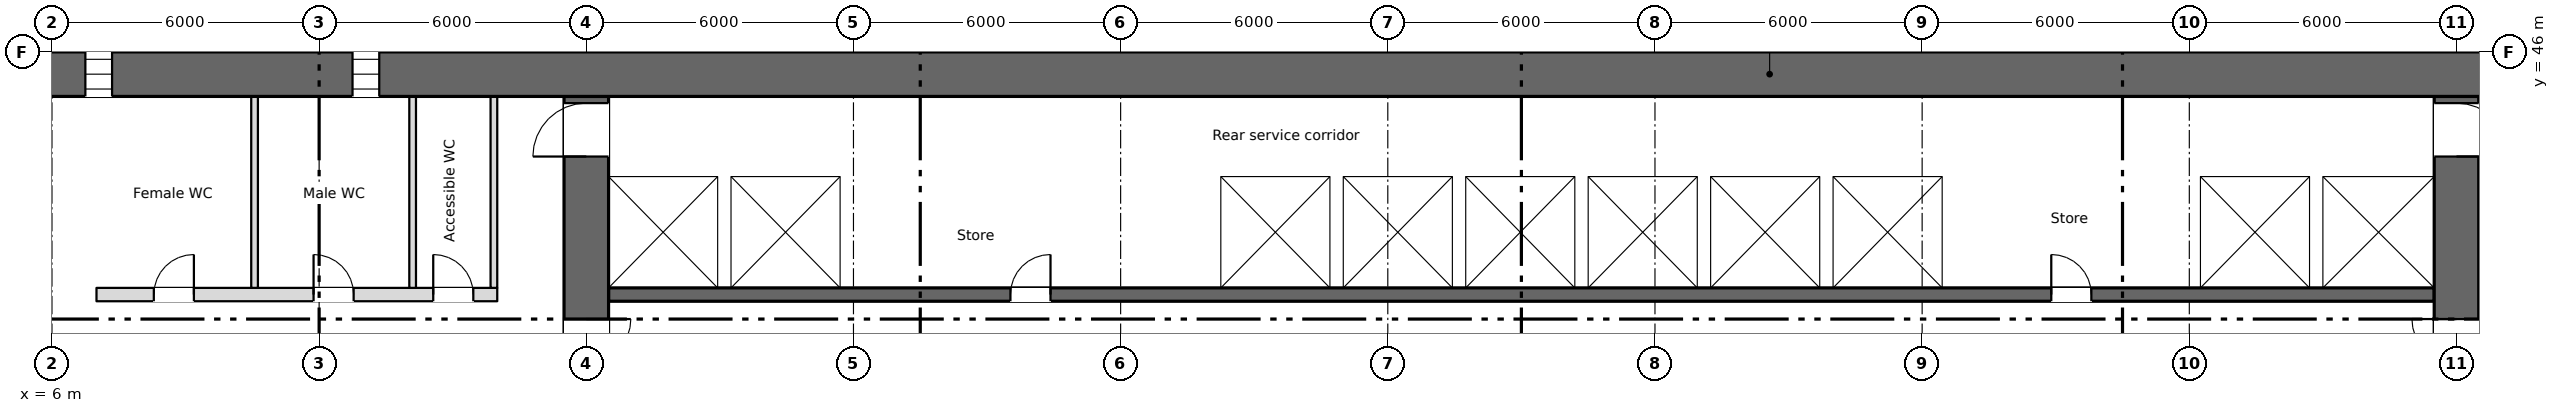
"""IFC4 building model, lengths in metres.
Left out: names, types, materials, properties, quantities, classifications, styles, units other than length and angle.
Written with IfcOpenShell. Run it as: python <this file> out.ifc"""

import sys

from ifc_helpers import new_model, si_unit, direction, frame, frame_2d, origin, place, context, subcontext, project, spatial, rectangle, extrude, element, fill, save


model = new_model("IFC4")
c1 = context("Model", 3, precision=1e-05, world=origin(), true_north=direction((0.0, 1.0)))
c2 = subcontext(c1, "Body", "Model", "MODEL_VIEW")
j1 = project(units=[si_unit("LENGTHUNIT", "METRE"), si_unit("PLANEANGLEUNIT", "RADIAN")], contexts=[c1])
p1 = place(None, origin())
s1 = spatial("IfcSite", under=j1, at=p1, CompositionType="ELEMENT")
p2 = place(p1, origin())
s2 = spatial("IfcBuilding", under=s1, at=p2, CompositionType="ELEMENT")
p3 = place(p2, frame((0.0, 0.0, 52.5)))
s3 = spatial("IfcBuildingStorey", under=s2, at=p3, CompositionType="ELEMENT", Elevation=52.5)
p4 = place(p3, frame((5.55, 45.5, 0.0), z_axis=(0.0, 0.0, 1.0), x_axis=(1.0, 0.0, 0.0)))
e1 = element("IfcWall", 1, at=p4, inside=s3, PredefinedType="SHEAR", context=c2, shape_type="SweptSolid", body=[
    extrude(rectangle(XDim=66.9, YDim=1.0, at=frame_2d((33.45, 0.0))), origin(), (0.0, 0.0, 1.0), 3.35),
])
p5 = place(p4, frame((1.2, 0.0, 0.6)))
e2 = element("IfcOpeningElement", 2, at=p5, cuts=e1, PredefinedType="OPENING", context=c2, shape_type="SweptSolid", body=[
    extrude(rectangle(XDim=0.6, YDim=2.4, at=frame_2d((0.3, 1.2))), frame((0.0, 0.51, 0.0), z_axis=(0.0, -1.0, 0.0), x_axis=(1.0, 0.0, 0.0)), (0.0, 0.0, 1.0), 1.02),
])
p6 = place(p4, frame((7.2, 0.0, 0.6)))
e3 = element("IfcOpeningElement", 3, at=p6, cuts=e1, PredefinedType="OPENING", context=c2, shape_type="SweptSolid", body=[
    extrude(rectangle(XDim=0.6, YDim=2.4, at=frame_2d((0.3, 1.2))), frame((0.0, 0.51, 0.0), z_axis=(0.0, -1.0, 0.0), x_axis=(1.0, 0.0, 0.0)), (0.0, 0.0, 1.0), 1.02),
])
p7 = place(p4, frame((61.2, 0.0, 0.6)))
e4 = element("IfcOpeningElement", 4, at=p7, cuts=e1, PredefinedType="OPENING", context=c2, shape_type="SweptSolid", body=[
    extrude(rectangle(XDim=0.6, YDim=2.4, at=frame_2d((0.3, 1.2))), frame((0.0, 0.51, 0.0), z_axis=(0.0, -1.0, 0.0), x_axis=(1.0, 0.0, 0.0)), (0.0, 0.0, 1.0), 1.02),
])
p8 = place(p3, frame((6.85, 28.4, 0.0), z_axis=(0.0, 0.0, 1.0), x_axis=(0.0, 1.0, 0.0)))
e5 = element("IfcWall", 5, at=p8, inside=s3, PredefinedType="SHEAR", context=c2, shape_type="SweptSolid", body=[
    extrude(rectangle(XDim=16.6, YDim=0.3, at=frame_2d((8.3, 0.0))), origin(), (0.0, 0.0, 1.0), 3.35),
])
p9 = place(p3, frame((18.0, 28.4, 0.0), z_axis=(0.0, 0.0, 1.0), x_axis=(0.0, 1.0, 0.0)))
e6 = element("IfcWall", 6, at=p9, inside=s3, PredefinedType="SHEAR", context=c2, shape_type="SweptSolid", body=[
    extrude(rectangle(XDim=16.6, YDim=1.0, at=frame_2d((8.3, 0.0))), origin(), (0.0, 0.0, 1.0), 3.35),
])
p10 = place(p9, frame((9.6, 0.0, 0.0)))
e7 = element("IfcOpeningElement", 7, at=p10, cuts=e6, PredefinedType="OPENING", context=c2, shape_type="SweptSolid", body=[
    extrude(rectangle(XDim=2.0, YDim=2.1, at=frame_2d((1.0, 1.05))), frame((0.0, 0.51, 0.0), z_axis=(0.0, -1.0, 0.0), x_axis=(1.0, 0.0, 0.0)), (0.0, 0.0, 1.0), 1.02),
])
p11 = place(p9, frame((15.25, 0.0, 0.0)))
e8 = element("IfcOpeningElement", 8, at=p11, cuts=e6, PredefinedType="OPENING", context=c2, shape_type="SweptSolid", body=[
    extrude(rectangle(XDim=1.2, YDim=2.1, at=frame_2d((0.6, 1.05))), frame((0.0, 0.51, 0.0), z_axis=(0.0, -1.0, 0.0), x_axis=(1.0, 0.0, 0.0)), (0.0, 0.0, 1.0), 1.02),
])
p12 = place(p3, frame((60.0, 28.4, 0.0), z_axis=(0.0, 0.0, 1.0), x_axis=(0.0, 1.0, 0.0)))
e9 = element("IfcWall", 9, at=p12, inside=s3, PredefinedType="SHEAR", context=c2, shape_type="SweptSolid", body=[
    extrude(rectangle(XDim=16.6, YDim=1.0, at=frame_2d((8.3, 0.0))), origin(), (0.0, 0.0, 1.0), 3.35),
])
p13 = place(p12, frame((9.6, 0.0, 0.0)))
e10 = element("IfcOpeningElement", 10, at=p13, cuts=e9, PredefinedType="OPENING", context=c2, shape_type="SweptSolid", body=[
    extrude(rectangle(XDim=2.0, YDim=2.1, at=frame_2d((1.0, 1.05))), frame((0.0, 0.51, 0.0), z_axis=(0.0, -1.0, 0.0), x_axis=(1.0, 0.0, 0.0)), (0.0, 0.0, 1.0), 1.02),
])
p14 = place(p12, frame((15.25, 0.0, 0.0)))
e11 = element("IfcOpeningElement", 11, at=p14, cuts=e9, PredefinedType="OPENING", context=c2, shape_type="SweptSolid", body=[
    extrude(rectangle(XDim=1.2, YDim=2.1, at=frame_2d((0.6, 1.05))), frame((0.0, 0.51, 0.0), z_axis=(0.0, -1.0, 0.0), x_axis=(1.0, 0.0, 0.0)), (0.0, 0.0, 1.0), 1.02),
])
p15 = place(p3, frame((18.5, 40.55, 0.0), z_axis=(0.0, 0.0, 1.0), x_axis=(1.0, 0.0, 0.0)))
e12 = element("IfcWall", 12, at=p15, inside=s3, PredefinedType="SHEAR", context=c2, shape_type="SweptSolid", body=[
    extrude(rectangle(XDim=41.0, YDim=0.3, at=frame_2d((20.5, 0.0))), origin(), (0.0, 0.0, 1.0), 3.35),
])
p16 = place(p15, frame((9.025, 0.0, 0.0)))
e13 = element("IfcOpeningElement", 13, at=p16, cuts=e12, PredefinedType="OPENING", context=c2, shape_type="SweptSolid", body=[
    extrude(rectangle(XDim=0.9, YDim=2.1, at=frame_2d((0.45, 1.05))), frame((0.0, 0.16, 0.0), z_axis=(0.0, -1.0, 0.0), x_axis=(1.0, 0.0, 0.0)), (0.0, 0.0, 1.0), 0.32),
])
p17 = place(p15, frame((32.4, 0.0, 0.0)))
e14 = element("IfcOpeningElement", 14, at=p17, cuts=e12, PredefinedType="OPENING", context=c2, shape_type="SweptSolid", body=[
    extrude(rectangle(XDim=0.9, YDim=2.1, at=frame_2d((0.45, 1.05))), frame((0.0, 0.16, 0.0), z_axis=(0.0, -1.0, 0.0), x_axis=(1.0, 0.0, 0.0)), (0.0, 0.0, 1.0), 0.32),
])
p18 = place(p15, frame((14.425, 0.0, 0.0)))
e15 = element("IfcOpeningElement", 15, at=p18, cuts=e12, PredefinedType="OPENING", context=c2, shape_type="SweptSolid", body=[
    extrude(rectangle(XDim=1.1, YDim=2.1, at=frame_2d((0.55, 1.05))), frame((0.0, 0.16, 0.0), z_axis=(0.0, -1.0, 0.0), x_axis=(1.0, 0.0, 0.0)), (0.0, 0.0, 1.0), 0.32),
])
p19 = place(p15, frame((17.175, 0.0, 0.0)))
e16 = element("IfcOpeningElement", 16, at=p19, cuts=e12, PredefinedType="OPENING", context=c2, shape_type="SweptSolid", body=[
    extrude(rectangle(XDim=1.1, YDim=2.1, at=frame_2d((0.55, 1.05))), frame((0.0, 0.16, 0.0), z_axis=(0.0, -1.0, 0.0), x_axis=(1.0, 0.0, 0.0)), (0.0, 0.0, 1.0), 0.32),
])
p20 = place(p15, frame((19.925, 0.0, 0.0)))
e17 = element("IfcOpeningElement", 17, at=p20, cuts=e12, PredefinedType="OPENING", context=c2, shape_type="SweptSolid", body=[
    extrude(rectangle(XDim=1.1, YDim=2.1, at=frame_2d((0.55, 1.05))), frame((0.0, 0.16, 0.0), z_axis=(0.0, -1.0, 0.0), x_axis=(1.0, 0.0, 0.0)), (0.0, 0.0, 1.0), 0.32),
])
p21 = place(p15, frame((22.675, 0.0, 0.0)))
e18 = element("IfcOpeningElement", 18, at=p21, cuts=e12, PredefinedType="OPENING", context=c2, shape_type="SweptSolid", body=[
    extrude(rectangle(XDim=1.1, YDim=2.1, at=frame_2d((0.55, 1.05))), frame((0.0, 0.16, 0.0), z_axis=(0.0, -1.0, 0.0), x_axis=(1.0, 0.0, 0.0)), (0.0, 0.0, 1.0), 0.32),
])
p22 = place(p15, frame((36.375, 0.0, 0.0)))
e19 = element("IfcOpeningElement", 19, at=p22, cuts=e12, PredefinedType="OPENING", context=c2, shape_type="SweptSolid", body=[
    extrude(rectangle(XDim=1.2, YDim=2.1, at=frame_2d((0.6, 1.05))), frame((0.0, 0.16, 0.0), z_axis=(0.0, -1.0, 0.0), x_axis=(1.0, 0.0, 0.0)), (0.0, 0.0, 1.0), 0.32),
])
p23 = place(p15, frame((39.15, 0.0, 0.0)))
e20 = element("IfcOpeningElement", 20, at=p23, cuts=e12, PredefinedType="OPENING", context=c2, shape_type="SweptSolid", body=[
    extrude(rectangle(XDim=1.2, YDim=2.1, at=frame_2d((0.6, 1.05))), frame((0.0, 0.16, 0.0), z_axis=(0.0, -1.0, 0.0), x_axis=(1.0, 0.0, 0.0)), (0.0, 0.0, 1.0), 0.32),
])
p24 = place(p3, frame((18.5, 43.35, 0.0), z_axis=(0.0, 0.0, 1.0), x_axis=(1.0, 0.0, 0.0)))
e21 = element("IfcWall", 21, at=p24, inside=s3, PredefinedType="SHEAR", context=c2, shape_type="SweptSolid", body=[
    extrude(rectangle(XDim=41.0, YDim=0.3, at=frame_2d((20.5, 0.0))), origin(), (0.0, 0.0, 1.0), 3.35),
])
p25 = place(p3, frame((7.0, 40.55, 0.0), z_axis=(0.0, 0.0, 1.0), x_axis=(1.0, 0.0, 0.0)))
e22 = element("IfcWall", 22, at=p25, inside=s3, PredefinedType="PARTITIONING", context=c2, shape_type="SweptSolid", body=[
    extrude(rectangle(XDim=9.0, YDim=0.3, at=frame_2d((4.5, 0.0))), origin(), (0.0, 0.0, 1.0), 3.35),
])
p26 = place(p25, frame((1.288, 0.0, 0.0)))
e23 = element("IfcOpeningElement", 23, at=p26, cuts=e22, PredefinedType="OPENING", context=c2, shape_type="SweptSolid", body=[
    extrude(rectangle(XDim=0.9, YDim=2.1, at=frame_2d((0.45, 1.05))), frame((0.0, 0.16, 0.0), z_axis=(0.0, -1.0, 0.0), x_axis=(1.0, 0.0, 0.0)), (0.0, 0.0, 1.0), 0.32),
])
p27 = place(p25, frame((4.875, 0.0, 0.0)))
e24 = element("IfcOpeningElement", 24, at=p27, cuts=e22, PredefinedType="OPENING", context=c2, shape_type="SweptSolid", body=[
    extrude(rectangle(XDim=0.9, YDim=2.1, at=frame_2d((0.45, 1.05))), frame((0.0, 0.16, 0.0), z_axis=(0.0, -1.0, 0.0), x_axis=(1.0, 0.0, 0.0)), (0.0, 0.0, 1.0), 0.32),
])
p28 = place(p25, frame((7.562, 0.0, 0.0)))
e25 = element("IfcOpeningElement", 25, at=p28, cuts=e22, PredefinedType="OPENING", context=c2, shape_type="SweptSolid", body=[
    extrude(rectangle(XDim=0.9, YDim=2.1, at=frame_2d((0.45, 1.05))), frame((0.0, 0.16, 0.0), z_axis=(0.0, -1.0, 0.0), x_axis=(1.0, 0.0, 0.0)), (0.0, 0.0, 1.0), 0.32),
])
for number, where, z_axis, x_axis in (
    (26, (21.1, 40.7, 0.0), (0.0, 0.0, 1.0), (0.0, 1.0, 0.0)),
    (27, (23.85, 40.7, 0.0), (0.0, 0.0, 1.0), (0.0, 1.0, 0.0)),
    (28, (32.1, 40.7, 0.0), (0.0, 0.0, 1.0), (0.0, 1.0, 0.0)),
    (29, (34.85, 40.7, 0.0), (0.0, 0.0, 1.0), (0.0, 1.0, 0.0)),
    (30, (37.6, 40.7, 0.0), (0.0, 0.0, 1.0), (0.0, 1.0, 0.0)),
    (31, (40.35, 40.7, 0.0), (0.0, 0.0, 1.0), (0.0, 1.0, 0.0)),
    (32, (43.1, 40.7, 0.0), (0.0, 0.0, 1.0), (0.0, 1.0, 0.0)),
    (33, (45.85, 40.7, 0.0), (0.0, 0.0, 1.0), (0.0, 1.0, 0.0)),
    (34, (48.6, 40.7, 0.0), (0.0, 0.0, 1.0), (0.0, 1.0, 0.0)),
    (35, (54.1, 40.7, 0.0), (0.0, 0.0, 1.0), (0.0, 1.0, 0.0)),
    (36, (56.85, 40.7, 0.0), (0.0, 0.0, 1.0), (0.0, 1.0, 0.0)),
):
    element("IfcWall", number, at=place(p3, frame(where, z_axis=z_axis, x_axis=x_axis)), inside=s3, PredefinedType="SHEAR", context=c2, shape_type="SweptSolid", body=[
        extrude(rectangle(XDim=2.5, YDim=0.3, at=frame_2d((1.25, 0.0))), origin(), (0.0, 0.0, 1.0), 3.35),
    ])
for number, where, z_axis, x_axis in (
    (37, (15.925, 40.7, 0.0), (0.0, 0.0, 1.0), (0.0, 1.0, 0.0)),
    (38, (10.55, 40.7, 0.0), (0.0, 0.0, 1.0), (0.0, 1.0, 0.0)),
    (39, (14.1, 40.7, 0.0), (0.0, 0.0, 1.0), (0.0, 1.0, 0.0)),
):
    element("IfcWall", number, at=place(p3, frame(where, z_axis=z_axis, x_axis=x_axis)), inside=s3, PredefinedType="PARTITIONING", context=c2, shape_type="SweptSolid", body=[
        extrude(rectangle(XDim=4.3, YDim=0.15, at=frame_2d((2.15, 0.0))), origin(), (0.0, 0.0, 1.0), 3.35),
    ])
p29 = place(p5, origin())
e40 = element("IfcWindow", 40, at=p29, inside=s3, PartitioningType="SINGLE_PANEL", PredefinedType="WINDOW", context=c2, shape_type="SweptSolid", body=[
    extrude(rectangle(XDim=0.6, YDim=2.4, at=frame_2d((0.3, 1.2))), frame((0.0, 0.03, 0.0), z_axis=(0.0, -1.0, 0.0), x_axis=(1.0, 0.0, 0.0)), (0.0, 0.0, 1.0), 0.06),
])
fill(e2, e40)
p30 = place(p6, origin())
e41 = element("IfcWindow", 41, at=p30, inside=s3, PartitioningType="SINGLE_PANEL", PredefinedType="WINDOW", context=c2, shape_type="SweptSolid", body=[
    extrude(rectangle(XDim=0.6, YDim=2.4, at=frame_2d((0.3, 1.2))), frame((0.0, 0.03, 0.0), z_axis=(0.0, -1.0, 0.0), x_axis=(1.0, 0.0, 0.0)), (0.0, 0.0, 1.0), 0.06),
])
fill(e3, e41)
p31 = place(p26, origin())
e42 = element("IfcDoor", 42, at=p31, inside=s3, OperationType="SINGLE_SWING_RIGHT", PredefinedType="DOOR", context=c2, shape_type="SweptSolid", body=[
    extrude(rectangle(XDim=0.9, YDim=2.1, at=frame_2d((0.45, 1.05))), frame((0.0, 0.025, 0.0), z_axis=(0.0, -1.0, 0.0), x_axis=(1.0, 0.0, 0.0)), (0.0, 0.0, 1.0), 0.05),
])
fill(e23, e42)
p32 = place(p27, origin())
e43 = element("IfcDoor", 43, at=p32, inside=s3, OperationType="SINGLE_SWING_LEFT", PredefinedType="DOOR", context=c2, shape_type="SweptSolid", body=[
    extrude(rectangle(XDim=0.9, YDim=2.1, at=frame_2d((0.45, 1.05))), frame((0.0, 0.025, 0.0), z_axis=(0.0, -1.0, 0.0), x_axis=(1.0, 0.0, 0.0)), (0.0, 0.0, 1.0), 0.05),
])
fill(e24, e43)
p33 = place(p28, origin())
e44 = element("IfcDoor", 44, at=p33, inside=s3, OperationType="SINGLE_SWING_LEFT", PredefinedType="DOOR", context=c2, shape_type="SweptSolid", body=[
    extrude(rectangle(XDim=0.9, YDim=2.1, at=frame_2d((0.45, 1.05))), frame((0.0, 0.025, 0.0), z_axis=(0.0, -1.0, 0.0), x_axis=(1.0, 0.0, 0.0)), (0.0, 0.0, 1.0), 0.05),
])
fill(e25, e44)
p34 = place(p16, origin())
e45 = element("IfcDoor", 45, at=p34, inside=s3, OperationType="SINGLE_SWING_RIGHT", PredefinedType="DOOR", context=c2, shape_type="SweptSolid", body=[
    extrude(rectangle(XDim=0.9, YDim=2.1, at=frame_2d((0.45, 1.05))), frame((0.0, 0.025, 0.0), z_axis=(0.0, -1.0, 0.0), x_axis=(1.0, 0.0, 0.0)), (0.0, 0.0, 1.0), 0.05),
])
fill(e13, e45)
p35 = place(p17, origin())
e46 = element("IfcDoor", 46, at=p35, inside=s3, OperationType="SINGLE_SWING_LEFT", PredefinedType="DOOR", context=c2, shape_type="SweptSolid", body=[
    extrude(rectangle(XDim=0.9, YDim=2.1, at=frame_2d((0.45, 1.05))), frame((0.0, 0.025, 0.0), z_axis=(0.0, -1.0, 0.0), x_axis=(1.0, 0.0, 0.0)), (0.0, 0.0, 1.0), 0.05),
])
fill(e14, e46)
p36 = place(p18, origin())
e47 = element("IfcDoor", 47, at=p36, inside=s3, OperationType="SLIDING_TO_LEFT", PredefinedType="DOOR", context=c2, shape_type="SweptSolid", body=[
    extrude(rectangle(XDim=1.1, YDim=2.1, at=frame_2d((0.55, 1.05))), frame((0.0, 0.025, 0.0), z_axis=(0.0, -1.0, 0.0), x_axis=(1.0, 0.0, 0.0)), (0.0, 0.0, 1.0), 0.05),
])
fill(e15, e47)
p37 = place(p19, origin())
e48 = element("IfcDoor", 48, at=p37, inside=s3, OperationType="SLIDING_TO_LEFT", PredefinedType="DOOR", context=c2, shape_type="SweptSolid", body=[
    extrude(rectangle(XDim=1.1, YDim=2.1, at=frame_2d((0.55, 1.05))), frame((0.0, 0.025, 0.0), z_axis=(0.0, -1.0, 0.0), x_axis=(1.0, 0.0, 0.0)), (0.0, 0.0, 1.0), 0.05),
])
fill(e16, e48)
p38 = place(p20, origin())
e49 = element("IfcDoor", 49, at=p38, inside=s3, OperationType="SLIDING_TO_LEFT", PredefinedType="DOOR", context=c2, shape_type="SweptSolid", body=[
    extrude(rectangle(XDim=1.1, YDim=2.1, at=frame_2d((0.55, 1.05))), frame((0.0, 0.025, 0.0), z_axis=(0.0, -1.0, 0.0), x_axis=(1.0, 0.0, 0.0)), (0.0, 0.0, 1.0), 0.05),
])
fill(e17, e49)
p39 = place(p21, origin())
e50 = element("IfcDoor", 50, at=p39, inside=s3, OperationType="SLIDING_TO_LEFT", PredefinedType="DOOR", context=c2, shape_type="SweptSolid", body=[
    extrude(rectangle(XDim=1.1, YDim=2.1, at=frame_2d((0.55, 1.05))), frame((0.0, 0.025, 0.0), z_axis=(0.0, -1.0, 0.0), x_axis=(1.0, 0.0, 0.0)), (0.0, 0.0, 1.0), 0.05),
])
fill(e18, e50)
p40 = place(p22, origin())
e51 = element("IfcDoor", 51, at=p40, inside=s3, OperationType="SLIDING_TO_LEFT", PredefinedType="DOOR", context=c2, shape_type="SweptSolid", body=[
    extrude(rectangle(XDim=1.2, YDim=2.1, at=frame_2d((0.6, 1.05))), frame((0.0, 0.025, 0.0), z_axis=(0.0, -1.0, 0.0), x_axis=(1.0, 0.0, 0.0)), (0.0, 0.0, 1.0), 0.05),
])
fill(e19, e51)
p41 = place(p23, origin())
e52 = element("IfcDoor", 52, at=p41, inside=s3, OperationType="SLIDING_TO_LEFT", PredefinedType="DOOR", context=c2, shape_type="SweptSolid", body=[
    extrude(rectangle(XDim=1.2, YDim=2.1, at=frame_2d((0.6, 1.05))), frame((0.0, 0.025, 0.0), z_axis=(0.0, -1.0, 0.0), x_axis=(1.0, 0.0, 0.0)), (0.0, 0.0, 1.0), 0.05),
])
fill(e20, e52)
p42 = place(p10, origin())
e53 = element("IfcDoor", 53, at=p42, inside=s3, OperationType="DOUBLE_DOOR_SINGLE_SWING", PredefinedType="DOOR", context=c2, shape_type="SweptSolid", body=[
    extrude(rectangle(XDim=2.0, YDim=2.1, at=frame_2d((1.0, 1.05))), frame((0.0, 0.025, 0.0), z_axis=(0.0, -1.0, 0.0), x_axis=(1.0, 0.0, 0.0)), (0.0, 0.0, 1.0), 0.05),
])
fill(e7, e53)
p43 = place(p13, origin())
e54 = element("IfcDoor", 54, at=p43, inside=s3, OperationType="DOUBLE_DOOR_SINGLE_SWING", PredefinedType="DOOR", context=c2, shape_type="SweptSolid", body=[
    extrude(rectangle(XDim=2.0, YDim=2.1, at=frame_2d((1.0, 1.05))), frame((0.0, 0.025, 0.0), z_axis=(0.0, -1.0, 0.0), x_axis=(1.0, 0.0, 0.0)), (0.0, 0.0, 1.0), 0.05),
])
fill(e10, e54)
p44 = place(p11, origin())
e55 = element("IfcDoor", 55, at=p44, inside=s3, OperationType="SINGLE_SWING_LEFT", PredefinedType="DOOR", context=c2, shape_type="SweptSolid", body=[
    extrude(rectangle(XDim=1.2, YDim=2.1, at=frame_2d((0.6, 1.05))), frame((0.0, 0.025, 0.0), z_axis=(0.0, -1.0, 0.0), x_axis=(1.0, 0.0, 0.0)), (0.0, 0.0, 1.0), 0.05),
])
fill(e8, e55)
p45 = place(p14, origin())
e56 = element("IfcDoor", 56, at=p45, inside=s3, OperationType="SINGLE_SWING_LEFT", PredefinedType="DOOR", context=c2, shape_type="SweptSolid", body=[
    extrude(rectangle(XDim=1.2, YDim=2.1, at=frame_2d((0.6, 1.05))), frame((0.0, 0.025, 0.0), z_axis=(0.0, -1.0, 0.0), x_axis=(1.0, 0.0, 0.0)), (0.0, 0.0, 1.0), 0.05),
])
fill(e11, e56)
save(model, sys.argv[1])
